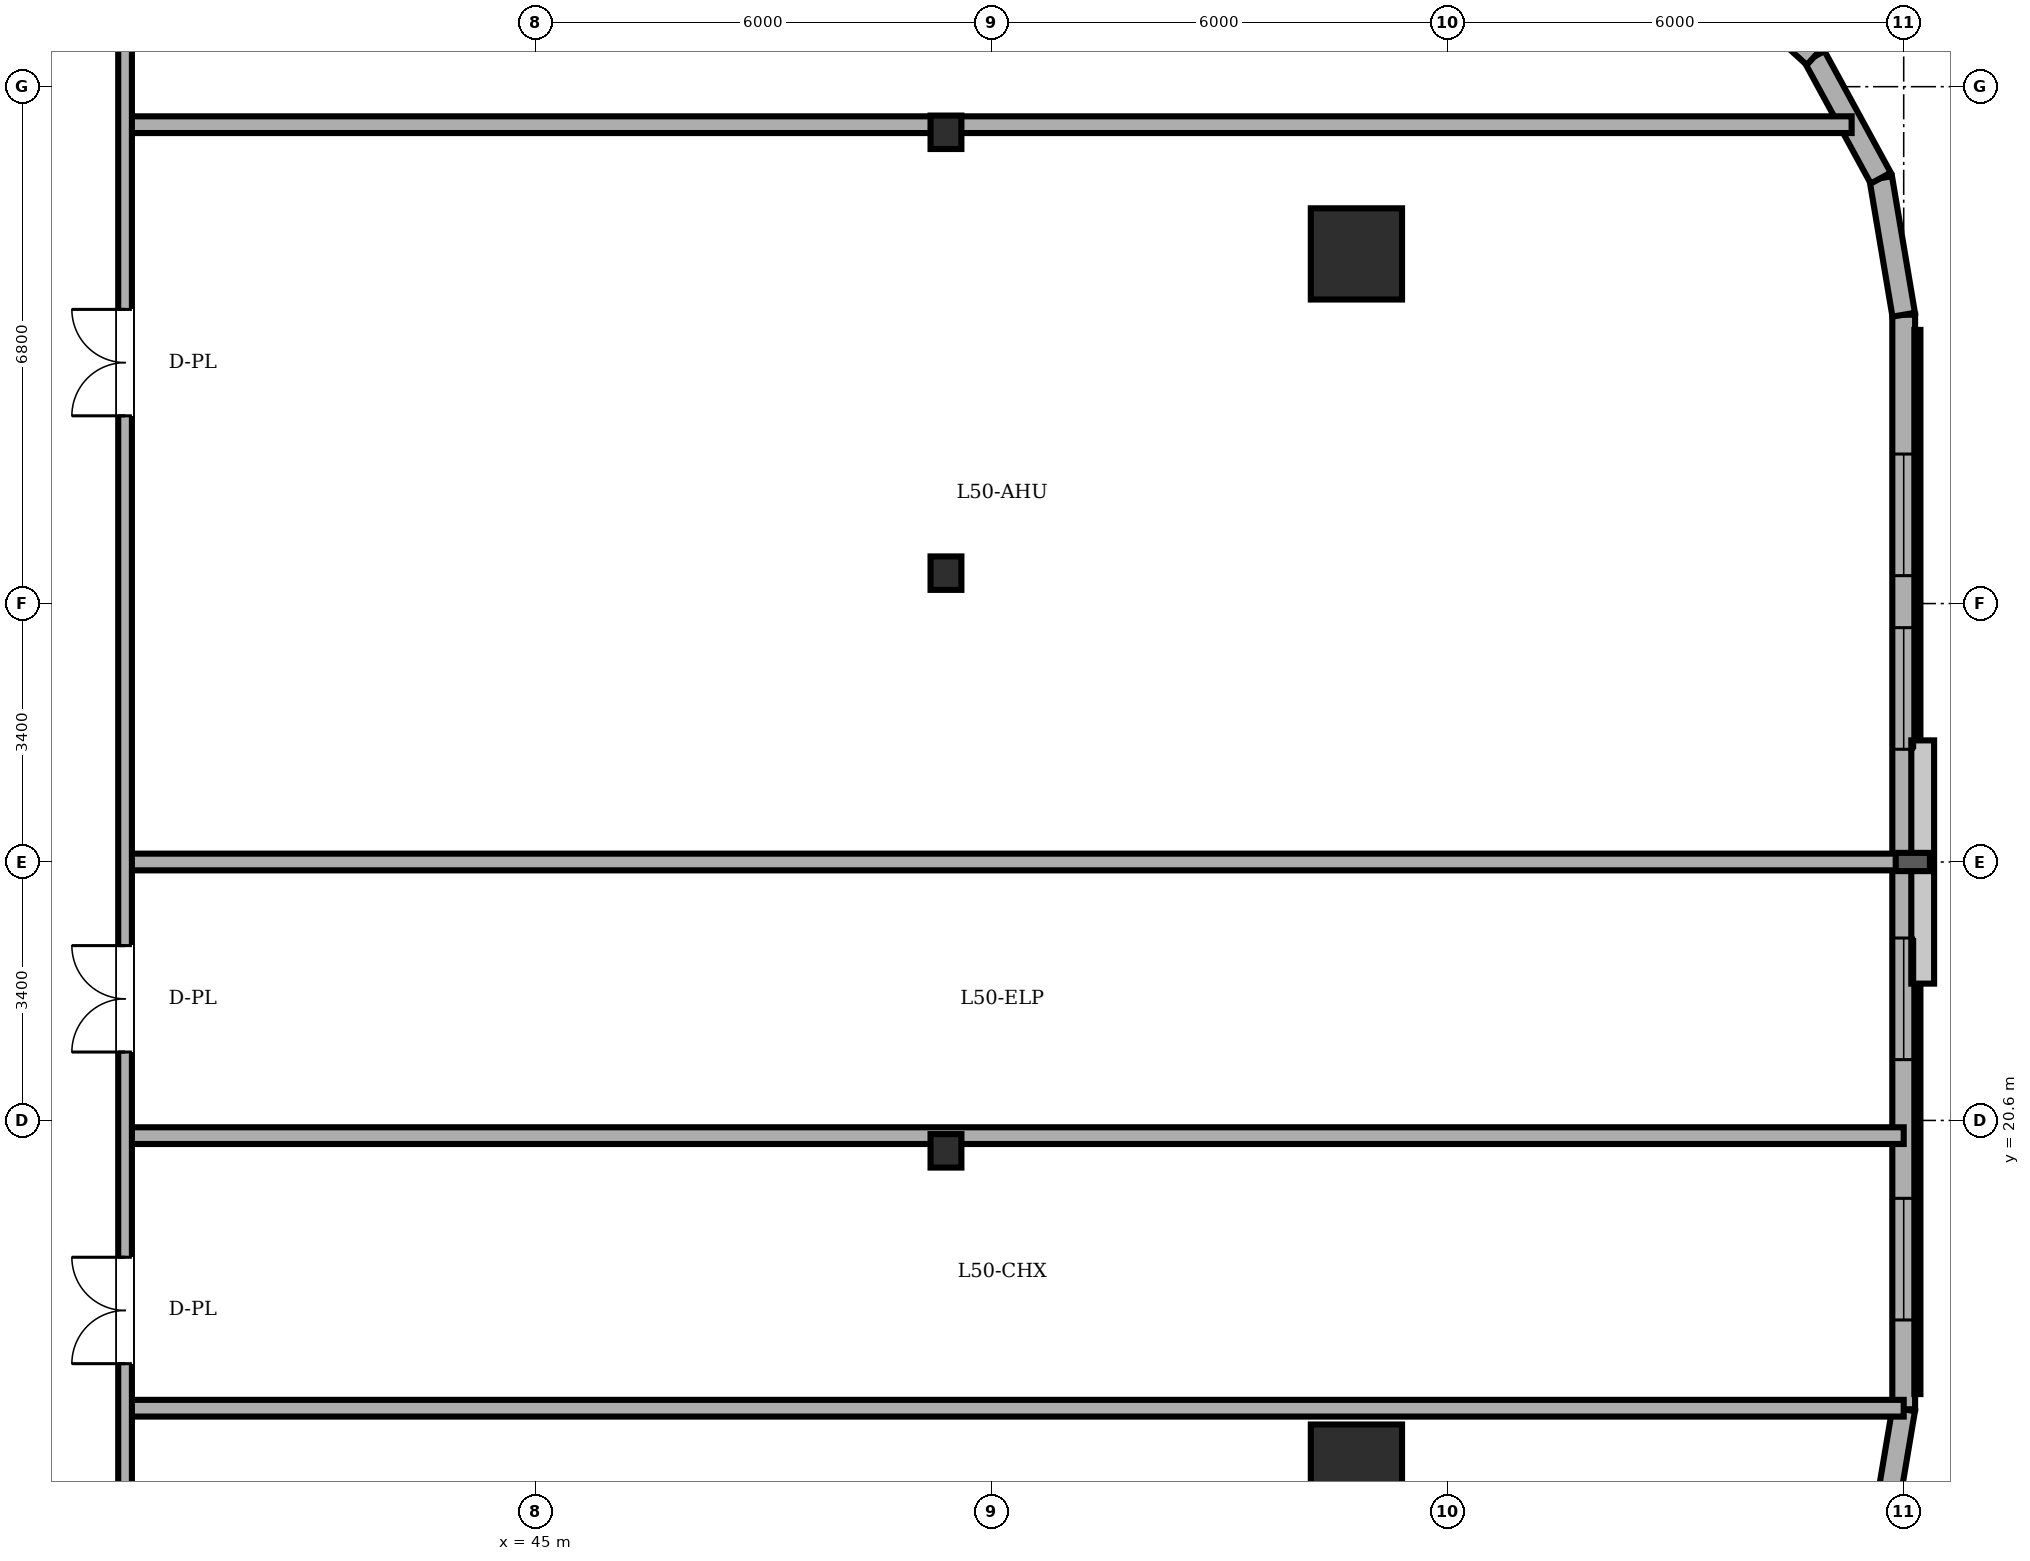
"""IFC4 building model, lengths in metres.
Left out: names, types, materials, properties, quantities, classifications, styles, units other than length and angle.
Written with IfcOpenShell. Run it as: python <this file> out.ifc"""

import sys

from ifc_helpers import new_model, si_unit, direction, frame, frame_2d, origin, origin_2d, place, context, subcontext, project, spatial, rectangle, circle, i_section, extrude, element, fill, save


model = new_model("IFC4")
c1 = context("Model", 3, precision=1e-05, world=origin(), true_north=direction((0.0, 1.0)))
c2 = subcontext(c1, "Body", "Model", "MODEL_VIEW")
j1 = project(units=[si_unit("LENGTHUNIT", "METRE"), si_unit("PLANEANGLEUNIT", "RADIAN")], contexts=[c1])
p1 = place(None, origin())
s1 = spatial("IfcSite", under=j1, at=p1, CompositionType="ELEMENT")
p2 = place(p1, origin())
s2 = spatial("IfcBuilding", under=s1, at=p2, CompositionType="ELEMENT")
p3 = place(p2, frame((0.0, 0.0, 190.6)))
s3 = spatial("IfcBuildingStorey", under=s2, at=p3, CompositionType="ELEMENT", Elevation=190.6)
for number, where, z_axis, x_axis in (
    (1, (55.8, 16.0, 0.0), (0.0, 0.0, 1.0), (1.0, 0.0, 0.0)),
    (2, (55.8, 32.0, 0.0), (0.0, 0.0, 1.0), (1.0, 0.0, 0.0)),
):
    element("IfcColumn", number, at=place(p3, frame(where, z_axis=z_axis, x_axis=x_axis)), inside=s3, PredefinedType="COLUMN", context=c2, shape_type="SweptSolid", body=[
        extrude(circle(Radius=0.6, at=origin_2d()), origin(), (0.0, 0.0, 1.0), 2.96),
    ])
for number, where, z_axis, x_axis in (
    (3, (50.4, 20.2, 0.0), (0.0, 0.0, 1.0), (1.0, 0.0, 0.0)),
    (4, (50.4, 27.8, 0.0), (0.0, 0.0, 1.0), (1.0, 0.0, 0.0)),
    (5, (50.4, 33.6, 0.0), (0.0, 0.0, 1.0), (1.0, 0.0, 0.0)),
):
    element("IfcColumn", number, at=place(p3, frame(where, z_axis=z_axis, x_axis=x_axis)), inside=s3, PredefinedType="COLUMN", context=c2, shape_type="SweptSolid", body=[
        extrude(i_section(OverallWidth=0.406, OverallDepth=0.44, WebThickness=0.024, FlangeThickness=0.039, FilletRadius=0.015, at=origin_2d()), origin(), (0.0, 0.0, 1.0), 2.96),
    ])
p4 = place(p3, frame((62.698, 15.003, 0.0), z_axis=(0.0, 0.0, 1.0), x_axis=(0.165724081207, 0.986172159873, 0.0)))
e6 = element("IfcWall", 6, at=p4, inside=s3, PredefinedType="SOLIDWALL", context=c2, shape_type="SweptSolid", body=[
    extrude(rectangle(XDim=1.822, YDim=0.3, at=frame_2d((0.911, 0.0))), origin(), (0.0, 0.0, 1.0), 5.36),
])
p5 = place(p3, frame((63.0, 16.8, 0.0), z_axis=(0.0, 0.0, 1.0), x_axis=(0.0, 1.0, 0.0)))
e7 = element("IfcWall", 7, at=p5, inside=s3, PredefinedType="SOLIDWALL", context=c2, shape_type="SweptSolid", body=[
    extrude(rectangle(XDim=14.4, YDim=0.3, at=frame_2d((7.2, 0.0))), origin(), (0.0, 0.0, 1.0), 5.36),
])
p6 = place(p5, frame((1.175, 0.0, 0.85)))
e8 = element("IfcOpeningElement", 8, at=p6, cuts=e7, PredefinedType="OPENING", context=c2, shape_type="SweptSolid", body=[
    extrude(rectangle(XDim=1.6, YDim=1.2, at=frame_2d((0.8, 0.6))), frame((0.0, 0.16, 0.0), z_axis=(0.0, -1.0, 0.0), x_axis=(1.0, 0.0, 0.0)), (0.0, 0.0, 1.0), 0.32),
])
p7 = place(p5, frame((4.6, 0.0, 0.85)))
e9 = element("IfcOpeningElement", 9, at=p7, cuts=e7, PredefinedType="OPENING", context=c2, shape_type="SweptSolid", body=[
    extrude(rectangle(XDim=1.6, YDim=1.2, at=frame_2d((0.8, 0.6))), frame((0.0, 0.16, 0.0), z_axis=(0.0, -1.0, 0.0), x_axis=(1.0, 0.0, 0.0)), (0.0, 0.0, 1.0), 0.32),
])
p8 = place(p5, frame((8.683, 0.0, 0.85)))
e10 = element("IfcOpeningElement", 10, at=p8, cuts=e7, PredefinedType="OPENING", context=c2, shape_type="SweptSolid", body=[
    extrude(rectangle(XDim=1.6, YDim=1.2, at=frame_2d((0.8, 0.6))), frame((0.0, 0.16, 0.0), z_axis=(0.0, -1.0, 0.0), x_axis=(1.0, 0.0, 0.0)), (0.0, 0.0, 1.0), 0.32),
])
p9 = place(p5, frame((10.967, 0.0, 0.85)))
e11 = element("IfcOpeningElement", 11, at=p9, cuts=e7, PredefinedType="OPENING", context=c2, shape_type="SweptSolid", body=[
    extrude(rectangle(XDim=1.6, YDim=1.2, at=frame_2d((0.8, 0.6))), frame((0.0, 0.16, 0.0), z_axis=(0.0, -1.0, 0.0), x_axis=(1.0, 0.0, 0.0)), (0.0, 0.0, 1.0), 0.32),
])
p10 = place(p3, frame((63.0, 31.2, 0.0), z_axis=(0.0, 0.0, 1.0), x_axis=(-0.165724081207, 0.986172159873, 0.0)))
e12 = element("IfcWall", 12, at=p10, inside=s3, PredefinedType="SOLIDWALL", context=c2, shape_type="SweptSolid", body=[
    extrude(rectangle(XDim=1.822, YDim=0.3, at=frame_2d((0.911, 0.0))), origin(), (0.0, 0.0, 1.0), 5.36),
])
p11 = place(p3, frame((62.698, 32.997, 0.0), z_axis=(0.0, 0.0, 1.0), x_axis=(-0.478608030646, 0.878028674362, 0.0)))
e13 = element("IfcWall", 13, at=p11, inside=s3, PredefinedType="SOLIDWALL", context=c2, shape_type="SweptSolid", body=[
    extrude(rectangle(XDim=1.822, YDim=0.3, at=frame_2d((0.911, 0.0))), origin(), (0.0, 0.0, 1.0), 5.36),
])
p12 = place(p3, frame((61.826, 34.597, 0.0), z_axis=(0.0, 0.0, 1.0), x_axis=(-0.73947929393, 0.673179302897, 0.0)))
e14 = element("IfcWall", 14, at=p12, inside=s3, PredefinedType="SOLIDWALL", context=c2, shape_type="SweptSolid", body=[
    extrude(rectangle(XDim=1.823, YDim=0.3, at=frame_2d((0.911, 0.0))), origin(), (0.0, 0.0, 1.0), 5.36),
])
p13 = place(p3, frame((39.6, 16.814, 0.0), z_axis=(0.0, 0.0, 1.0), x_axis=(1.0, 0.0, 0.0)))
e15 = element("IfcWall", 15, at=p13, inside=s3, PredefinedType="PARTITIONING", context=c2, shape_type="SweptSolid", body=[
    extrude(rectangle(XDim=23.4, YDim=0.22, at=frame_2d((11.7, 0.0))), origin(), (0.0, 0.0, 1.0), 5.36),
])
p14 = place(p3, frame((39.6, 20.4, 0.0), z_axis=(0.0, 0.0, 1.0), x_axis=(1.0, 0.0, 0.0)))
e16 = element("IfcWall", 16, at=p14, inside=s3, PredefinedType="PARTITIONING", context=c2, shape_type="SweptSolid", body=[
    extrude(rectangle(XDim=23.4, YDim=0.22, at=frame_2d((11.7, 0.0))), origin(), (0.0, 0.0, 1.0), 2.942),
])
p15 = place(p3, frame((39.6, 24.0, 0.0), z_axis=(0.0, 0.0, 1.0), x_axis=(1.0, 0.0, 0.0)))
e17 = element("IfcWall", 17, at=p15, inside=s3, PredefinedType="PARTITIONING", context=c2, shape_type="SweptSolid", body=[
    extrude(rectangle(XDim=23.4, YDim=0.22, at=frame_2d((11.7, 0.0))), origin(), (0.0, 0.0, 1.0), 5.042),
])
p16 = place(p3, frame((39.6, 33.7, 0.0), z_axis=(0.0, 0.0, 1.0), x_axis=(1.0, 0.0, 0.0)))
e18 = element("IfcWall", 18, at=p16, inside=s3, PredefinedType="PARTITIONING", context=c2, shape_type="SweptSolid", body=[
    extrude(rectangle(XDim=22.715, YDim=0.22, at=frame_2d((11.357, 0.0))), origin(), (0.0, 0.0, 1.0), 2.942),
])
p17 = place(p3, frame((39.6, 11.8, 0.0), z_axis=(0.0, 0.0, 1.0), x_axis=(0.0, 1.0, 0.0)))
e19 = element("IfcWall", 19, at=p17, inside=s3, PredefinedType="PARTITIONING", context=c2, shape_type="SweptSolid", body=[
    extrude(rectangle(XDim=24.4, YDim=0.18, at=frame_2d((12.2, 0.0))), origin(), (0.0, 0.0, 1.0), 5.36),
])
p18 = place(p17, frame((18.07, 0.0, 0.0)))
e20 = element("IfcOpeningElement", 20, at=p18, cuts=e19, PredefinedType="OPENING", context=c2, shape_type="SweptSolid", body=[
    extrude(rectangle(XDim=1.4, YDim=2.25, at=frame_2d((0.7, 1.125))), frame((0.0, 0.1, 0.0), z_axis=(0.0, -1.0, 0.0), x_axis=(1.0, 0.0, 0.0)), (0.0, 0.0, 1.0), 0.2),
])
p19 = place(p17, frame((5.6, 0.0, 0.0)))
e21 = element("IfcOpeningElement", 21, at=p19, cuts=e19, PredefinedType="OPENING", context=c2, shape_type="SweptSolid", body=[
    extrude(rectangle(XDim=1.4, YDim=2.25, at=frame_2d((0.7, 1.125))), frame((0.0, 0.1, 0.0), z_axis=(0.0, -1.0, 0.0), x_axis=(1.0, 0.0, 0.0)), (0.0, 0.0, 1.0), 0.2),
])
p20 = place(p17, frame((9.7, 0.0, 0.0)))
e22 = element("IfcOpeningElement", 22, at=p20, cuts=e19, PredefinedType="OPENING", context=c2, shape_type="SweptSolid", body=[
    extrude(rectangle(XDim=1.4, YDim=2.25, at=frame_2d((0.7, 1.125))), frame((0.0, 0.1, 0.0), z_axis=(0.0, -1.0, 0.0), x_axis=(1.0, 0.0, 0.0)), (0.0, 0.0, 1.0), 0.2),
])
p21 = place(p6, origin())
e23 = element("IfcWindow", 23, at=p21, inside=s3, PartitioningType="DOUBLE_PANEL_VERTICAL", PredefinedType="WINDOW", context=c2, shape_type="SweptSolid", body=[
    extrude(rectangle(XDim=1.6, YDim=1.2, at=frame_2d((0.8, 0.6))), frame((0.0, 0.03, 0.0), z_axis=(0.0, -1.0, 0.0), x_axis=(1.0, 0.0, 0.0)), (0.0, 0.0, 1.0), 0.06),
])
fill(e8, e23)
p22 = place(p7, origin())
e24 = element("IfcWindow", 24, at=p22, inside=s3, PartitioningType="DOUBLE_PANEL_VERTICAL", PredefinedType="WINDOW", context=c2, shape_type="SweptSolid", body=[
    extrude(rectangle(XDim=1.6, YDim=1.2, at=frame_2d((0.8, 0.6))), frame((0.0, 0.03, 0.0), z_axis=(0.0, -1.0, 0.0), x_axis=(1.0, 0.0, 0.0)), (0.0, 0.0, 1.0), 0.06),
])
fill(e9, e24)
p23 = place(p8, origin())
e25 = element("IfcWindow", 25, at=p23, inside=s3, PartitioningType="DOUBLE_PANEL_VERTICAL", PredefinedType="WINDOW", context=c2, shape_type="SweptSolid", body=[
    extrude(rectangle(XDim=1.6, YDim=1.2, at=frame_2d((0.8, 0.6))), frame((0.0, 0.03, 0.0), z_axis=(0.0, -1.0, 0.0), x_axis=(1.0, 0.0, 0.0)), (0.0, 0.0, 1.0), 0.06),
])
fill(e10, e25)
p24 = place(p9, origin())
e26 = element("IfcWindow", 26, at=p24, inside=s3, PartitioningType="DOUBLE_PANEL_VERTICAL", PredefinedType="WINDOW", context=c2, shape_type="SweptSolid", body=[
    extrude(rectangle(XDim=1.6, YDim=1.2, at=frame_2d((0.8, 0.6))), frame((0.0, 0.03, 0.0), z_axis=(0.0, -1.0, 0.0), x_axis=(1.0, 0.0, 0.0)), (0.0, 0.0, 1.0), 0.06),
])
fill(e11, e26)
p25 = place(p18, origin())
e27 = element("IfcDoor", 27, at=p25, inside=s3, OperationType="DOUBLE_DOOR_SINGLE_SWING", PredefinedType="DOOR", context=c2, shape_type="SweptSolid", body=[
    extrude(rectangle(XDim=1.4, YDim=2.25, at=frame_2d((0.7, 1.125))), frame((0.0, 0.025, 0.0), z_axis=(0.0, -1.0, 0.0), x_axis=(1.0, 0.0, 0.0)), (0.0, 0.0, 1.0), 0.05),
])
fill(e20, e27)
p26 = place(p19, origin())
e28 = element("IfcDoor", 28, at=p26, inside=s3, OperationType="DOUBLE_DOOR_SINGLE_SWING", PredefinedType="DOOR", context=c2, shape_type="SweptSolid", body=[
    extrude(rectangle(XDim=1.4, YDim=2.25, at=frame_2d((0.7, 1.125))), frame((0.0, 0.025, 0.0), z_axis=(0.0, -1.0, 0.0), x_axis=(1.0, 0.0, 0.0)), (0.0, 0.0, 1.0), 0.05),
])
fill(e21, e28)
p27 = place(p20, origin())
e29 = element("IfcDoor", 29, at=p27, inside=s3, OperationType="DOUBLE_DOOR_SINGLE_SWING", PredefinedType="DOOR", context=c2, shape_type="SweptSolid", body=[
    extrude(rectangle(XDim=1.4, YDim=2.25, at=frame_2d((0.7, 1.125))), frame((0.0, 0.025, 0.0), z_axis=(0.0, -1.0, 0.0), x_axis=(1.0, 0.0, 0.0)), (0.0, 0.0, 1.0), 0.05),
])
fill(e22, e29)
save(model, sys.argv[1])
